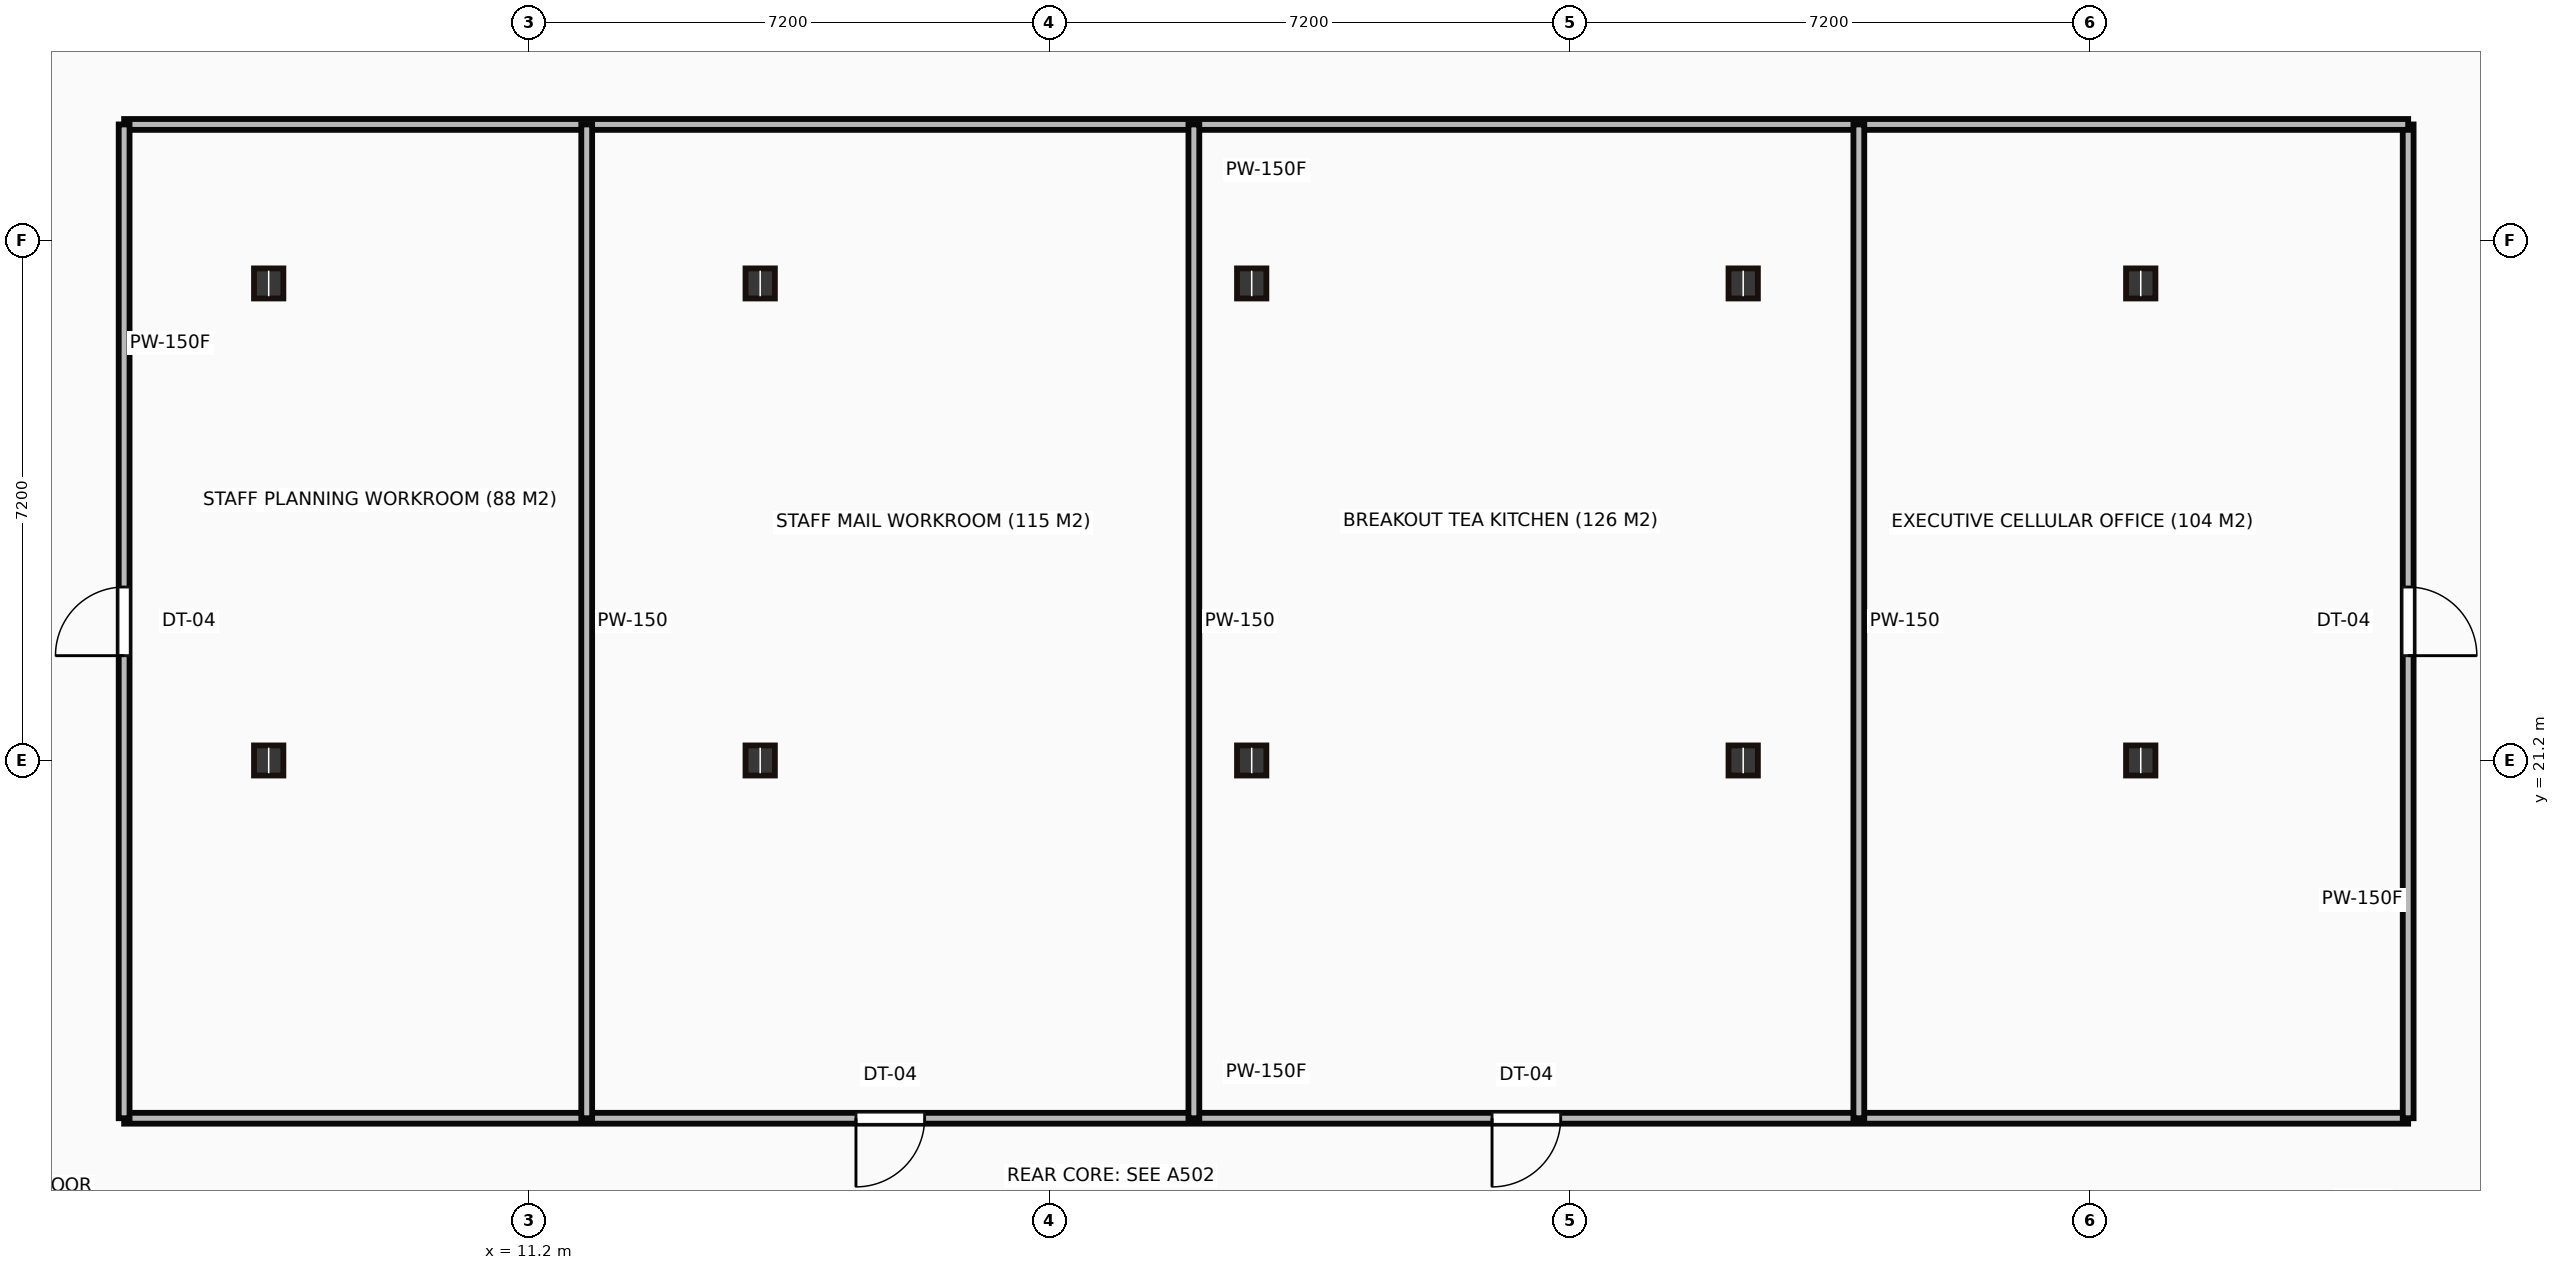
"""IFC4 building model, lengths in metres.
Left out: names, types, materials, properties, quantities, classifications, styles, units other than length and angle.
Written with IfcOpenShell. Run it as: python <this file> out.ifc"""

import sys

from ifc_helpers import new_model, si_unit, direction, frame, frame_2d, origin, origin_2d, place, context, subcontext, project, spatial, rectangle, i_section, extrude, source, transform, mapped, element, fill, save


model = new_model("IFC4")
c1 = context("Model", 3, precision=1e-05, world=origin(), true_north=direction((0.0, 1.0)))
c2 = subcontext(c1, "Body", "Model", "MODEL_VIEW")
j1 = project(units=[si_unit("LENGTHUNIT", "METRE"), si_unit("PLANEANGLEUNIT", "RADIAN")], contexts=[c1])
p1 = place(None, origin())
s1 = spatial("IfcSite", under=j1, at=p1, CompositionType="ELEMENT")
p2 = place(p1, origin())
s2 = spatial("IfcBuilding", under=s1, at=p2, CompositionType="ELEMENT")
p3 = place(p2, frame((0.0, 0.0, 47.1)))
s3 = spatial("IfcBuildingStorey", under=s2, at=p3, CompositionType="ELEMENT", Elevation=47.1)
m1 = source(origin(), c2, "Body", "SweptSolid", [
    extrude(i_section(OverallWidth=0.406, OverallDepth=0.416, WebThickness=0.03, FlangeThickness=0.048, at=origin_2d()), origin(), (0.0, 0.0, 1.0), 3.65),
])
for number, where, z_axis, x_axis in (
    (1, (7.6, 21.2, 0.0), (0.0, 0.0, 1.0), (1.0, 0.0, 0.0)),
    (2, (7.6, 27.8, 0.0), (0.0, 0.0, 1.0), (1.0, 0.0, 0.0)),
    (3, (14.4, 21.2, 0.0), (0.0, 0.0, 1.0), (1.0, 0.0, 0.0)),
    (4, (14.4, 27.8, 0.0), (0.0, 0.0, 1.0), (1.0, 0.0, 0.0)),
    (5, (21.2, 21.2, 0.0), (0.0, 0.0, 1.0), (1.0, 0.0, 0.0)),
    (6, (21.2, 27.8, 0.0), (0.0, 0.0, 1.0), (1.0, 0.0, 0.0)),
    (7, (28.0, 21.2, 0.0), (0.0, 0.0, 1.0), (1.0, 0.0, 0.0)),
    (8, (28.0, 27.8, 0.0), (0.0, 0.0, 1.0), (1.0, 0.0, 0.0)),
    (9, (33.5, 21.2, 0.0), (0.0, 0.0, 1.0), (1.0, 0.0, 0.0)),
    (10, (33.5, 27.8, 0.0), (0.0, 0.0, 1.0), (1.0, 0.0, 0.0)),
):
    element("IfcColumn", number, at=place(p3, frame(where, z_axis=z_axis, x_axis=x_axis)), inside=s3, PredefinedType="COLUMN", context=c2, shape_type="MappedRepresentation", body=[
        mapped(m1, transform((0.0, 0.0, 0.0))),
    ])
m2 = source(origin(), c2, "Body", "SweptSolid", [
    extrude(rectangle(XDim=31.6, YDim=0.15, at=frame_2d((15.8, 0.0))), origin(), (0.0, 0.0, 1.0), 3.4),
])
p4 = place(p3, frame((5.6, 16.25, 0.0), z_axis=(0.0, 0.0, 1.0), x_axis=(1.0, 0.0, 0.0)))
e11 = element("IfcWall", 11, at=p4, inside=s3, PredefinedType="PARTITIONING", context=c2, shape_type="MappedRepresentation", body=[
    mapped(m2, transform((0.0, 0.0, 0.0))),
])
p5 = place(p4, frame((10.125, 0.0, 0.0)))
e12 = element("IfcOpeningElement", 12, at=p5, cuts=e11, PredefinedType="OPENING", context=c2, shape_type="SweptSolid", body=[
    extrude(rectangle(XDim=0.95, YDim=2.15, at=frame_2d((0.475, 1.075))), frame((0.0, 0.085, 0.0), z_axis=(0.0, -1.0, 0.0), x_axis=(1.0, 0.0, 0.0)), (0.0, 0.0, 1.0), 0.17),
])
p6 = place(p4, frame((18.925, 0.0, 0.0)))
e13 = element("IfcOpeningElement", 13, at=p6, cuts=e11, PredefinedType="OPENING", context=c2, shape_type="SweptSolid", body=[
    extrude(rectangle(XDim=0.95, YDim=2.15, at=frame_2d((0.475, 1.075))), frame((0.0, 0.085, 0.0), z_axis=(0.0, -1.0, 0.0), x_axis=(1.0, 0.0, 0.0)), (0.0, 0.0, 1.0), 0.17),
])
m3 = source(origin(), c2, "Body", "SweptSolid", [
    extrude(rectangle(XDim=13.75, YDim=0.15, at=frame_2d((6.875, 0.0))), origin(), (0.0, 0.0, 1.0), 3.4),
])
p7 = place(p3, frame((37.2, 16.25, 0.0), z_axis=(0.0, 0.0, 1.0), x_axis=(0.0, 1.0, 0.0)))
e14 = element("IfcWall", 14, at=p7, inside=s3, PredefinedType="PARTITIONING", context=c2, shape_type="MappedRepresentation", body=[
    mapped(m3, transform((0.0, 0.0, 0.0))),
])
p8 = place(p7, frame((6.4, 0.0, 0.0)))
e15 = element("IfcOpeningElement", 15, at=p8, cuts=e14, PredefinedType="OPENING", context=c2, shape_type="SweptSolid", body=[
    extrude(rectangle(XDim=0.95, YDim=2.15, at=frame_2d((0.475, 1.075))), frame((0.0, 0.085, 0.0), z_axis=(0.0, -1.0, 0.0), x_axis=(1.0, 0.0, 0.0)), (0.0, 0.0, 1.0), 0.17),
])
m4 = source(origin(), c2, "Body", "SweptSolid", [
    extrude(rectangle(XDim=31.6, YDim=0.15, at=frame_2d((15.8, 0.0))), origin(), (0.0, 0.0, 1.0), 2.978),
])
p9 = place(p3, frame((37.2, 30.0, 0.0), z_axis=(0.0, 0.0, 1.0), x_axis=(-1.0, 0.0, 0.0)))
e16 = element("IfcWall", 16, at=p9, inside=s3, PredefinedType="PARTITIONING", context=c2, shape_type="MappedRepresentation", body=[
    mapped(m4, transform((0.0, 0.0, 0.0))),
])
p10 = place(p3, frame((5.6, 30.0, 0.0), z_axis=(0.0, 0.0, 1.0), x_axis=(0.0, -1.0, 0.0)))
e17 = element("IfcWall", 17, at=p10, inside=s3, PredefinedType="PARTITIONING", context=c2, shape_type="MappedRepresentation", body=[
    mapped(m3, transform((0.0, 0.0, 0.0))),
])
p11 = place(p10, frame((6.4, 0.0, 0.0)))
e18 = element("IfcOpeningElement", 18, at=p11, cuts=e17, PredefinedType="OPENING", context=c2, shape_type="SweptSolid", body=[
    extrude(rectangle(XDim=0.95, YDim=2.15, at=frame_2d((0.475, 1.075))), frame((0.0, 0.085, 0.0), z_axis=(0.0, -1.0, 0.0), x_axis=(1.0, 0.0, 0.0)), (0.0, 0.0, 1.0), 0.17),
])
for number, where, z_axis, x_axis in (
    (19, (12.0, 30.0, 0.0), (0.0, 0.0, 1.0), (0.0, -1.0, 0.0)),
    (20, (20.4, 30.0, 0.0), (0.0, 0.0, 1.0), (0.0, -1.0, 0.0)),
    (21, (29.6, 30.0, 0.0), (0.0, 0.0, 1.0), (0.0, -1.0, 0.0)),
):
    element("IfcWall", number, at=place(p3, frame(where, z_axis=z_axis, x_axis=x_axis)), inside=s3, PredefinedType="PARTITIONING", context=c2, shape_type="MappedRepresentation", body=[
        mapped(m3, transform((0.0, 0.0, 0.0))),
    ])
m5 = source(origin(), c2, "Body", "SweptSolid", [
    extrude(rectangle(XDim=0.95, YDim=2.15, at=frame_2d((0.475, 1.075))), frame((0.0, 0.025, 0.0), z_axis=(0.0, -1.0, 0.0), x_axis=(1.0, 0.0, 0.0)), (0.0, 0.0, 1.0), 0.05),
])
p12 = place(p11, origin())
e22 = element("IfcDoor", 22, at=p12, inside=s3, OperationType="SINGLE_SWING_RIGHT", PredefinedType="DOOR", context=c2, shape_type="MappedRepresentation", body=[
    mapped(m5, transform((0.0, 0.0, 0.0))),
])
fill(e18, e22)
p13 = place(p5, origin())
e23 = element("IfcDoor", 23, at=p13, inside=s3, OperationType="SINGLE_SWING_LEFT", PredefinedType="DOOR", context=c2, shape_type="MappedRepresentation", body=[
    mapped(m5, transform((0.0, 0.0, 0.0))),
])
fill(e12, e23)
p14 = place(p6, origin())
e24 = element("IfcDoor", 24, at=p14, inside=s3, OperationType="SINGLE_SWING_LEFT", PredefinedType="DOOR", context=c2, shape_type="MappedRepresentation", body=[
    mapped(m5, transform((0.0, 0.0, 0.0))),
])
fill(e13, e24)
p15 = place(p8, origin())
e25 = element("IfcDoor", 25, at=p15, inside=s3, OperationType="SINGLE_SWING_LEFT", PredefinedType="DOOR", context=c2, shape_type="MappedRepresentation", body=[
    mapped(m5, transform((0.0, 0.0, 0.0))),
])
fill(e15, e25)
save(model, sys.argv[1])
